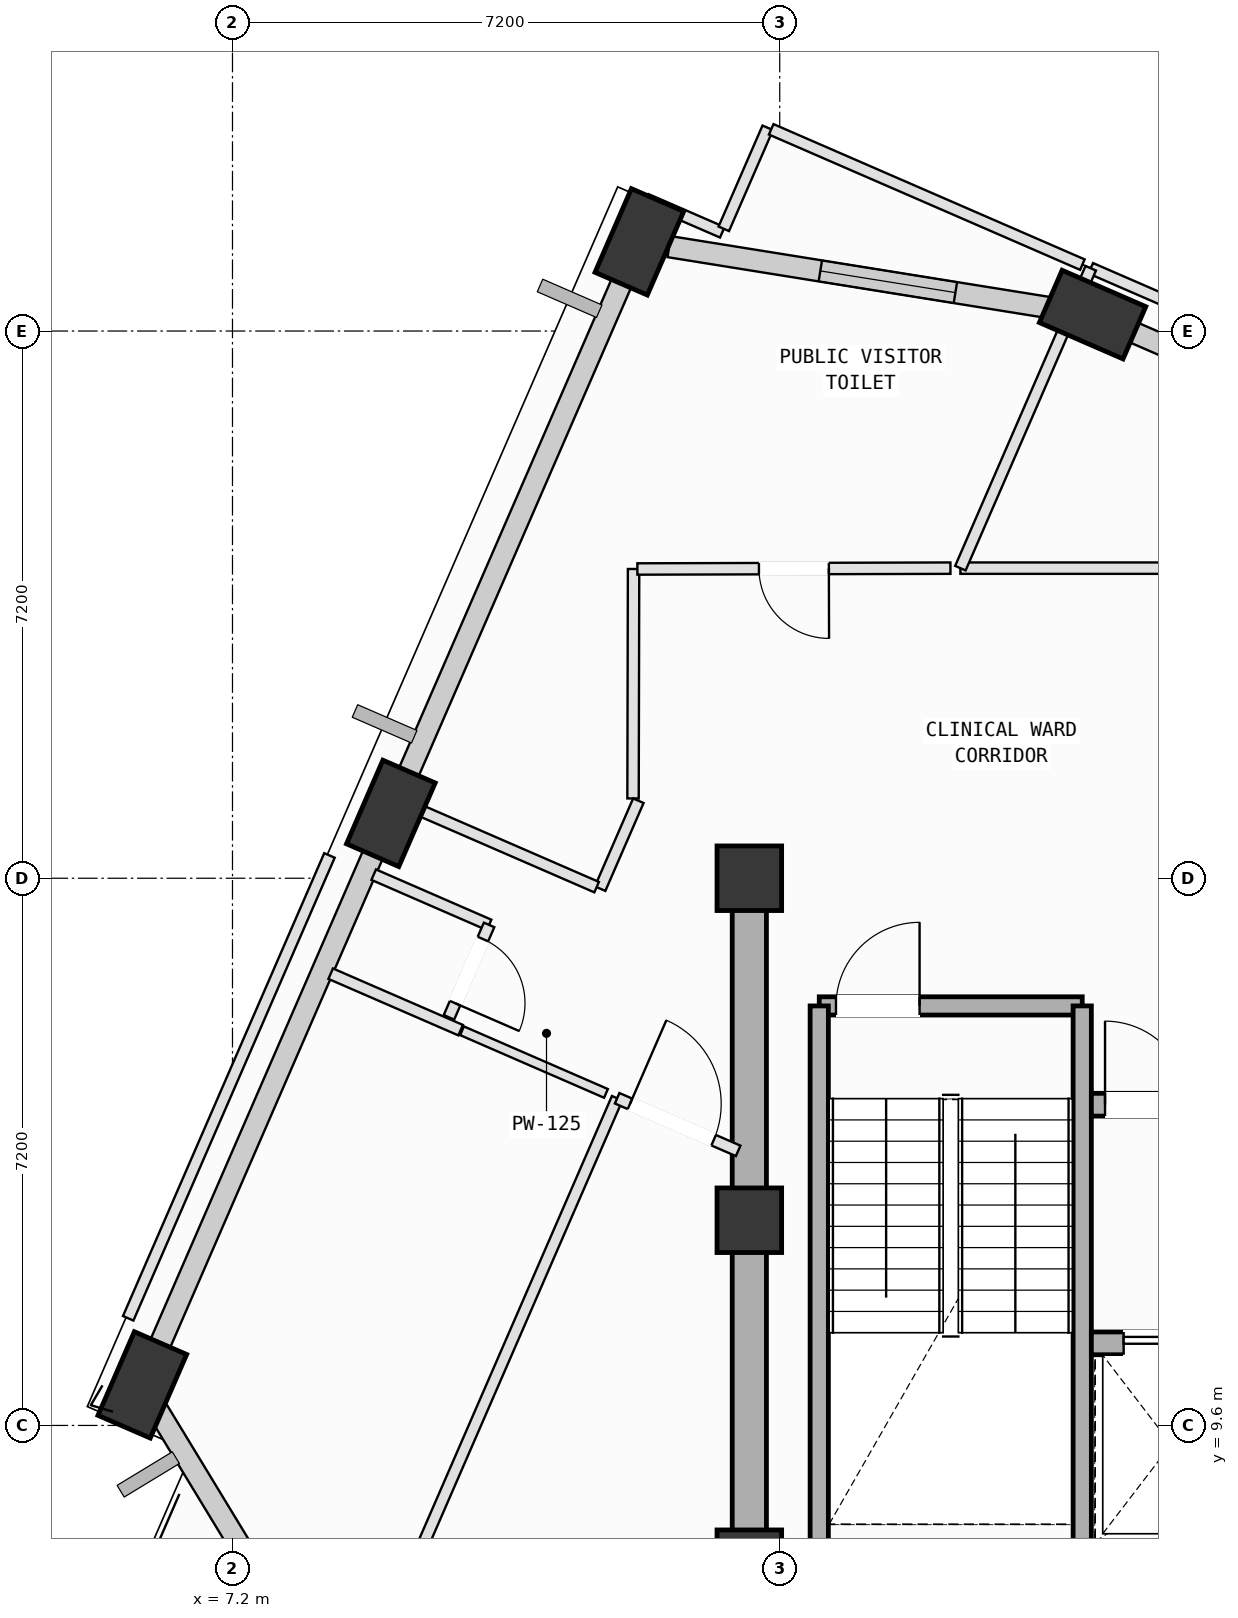
"""IFC4 building model, lengths in metres.
Left out: names, types, materials, properties, quantities, classifications, styles, units other than length and angle.
Written with IfcOpenShell. Run it as: python <this file> out.ifc"""

import sys

from ifc_helpers import new_model, si_unit, direction, frame, frame_2d, origin, origin_2d, place, context, subcontext, project, spatial, rectangle, extrude, element, fill, save


model = new_model("IFC4")
c1 = context("Model", 3, precision=1e-05, world=origin(), true_north=direction((0.0, 1.0)))
c2 = subcontext(c1, "Body", "Model", "MODEL_VIEW")
j1 = project(units=[si_unit("LENGTHUNIT", "METRE"), si_unit("PLANEANGLEUNIT", "RADIAN")], contexts=[c1])
p1 = place(None, origin())
s1 = spatial("IfcSite", under=j1, at=p1, CompositionType="ELEMENT")
p2 = place(p1, origin())
s2 = spatial("IfcBuilding", under=s1, at=p2, CompositionType="ELEMENT")
p3 = place(p2, frame((0.0, 0.0, 308.6)))
s3 = spatial("IfcBuildingStorey", under=s2, at=p3, CompositionType="ELEMENT", Elevation=308.6)
for number, where, z_axis, x_axis in (
    (1, (14.0, 7.8, 0.0), (0.0, 0.0, 1.0), (1.0, 0.0, 0.0)),
    (2, (14.0, 12.3, 0.0), (0.0, 0.0, 1.0), (1.0, 0.0, 0.0)),
    (3, (14.0, 16.8, 0.0), (0.0, 0.0, 1.0), (1.0, 0.0, 0.0)),
):
    element("IfcColumn", number, at=place(p3, frame(where, z_axis=z_axis, x_axis=x_axis)), inside=s3, PredefinedType="COLUMN", context=c2, shape_type="SweptSolid", body=[
        extrude(rectangle(XDim=0.85, YDim=0.85, at=origin_2d()), origin(), (0.0, 0.0, 1.0), 4.0),
    ])
for number, where, z_axis, x_axis in (
    (4, (18.516, 24.216, 0.002), (0.0, 0.0, 1.0), (-0.917, 0.399, 0.0)),
    (5, (12.553, 25.173, 0.002), (0.0, 0.0, 1.0), (0.399, 0.917, 0.0)),
    (6, (9.283, 17.654, 0.002), (0.0, 0.0, 1.0), (0.399, 0.917, 0.0)),
    (7, (6.014, 10.134, 0.002), (0.0, 0.0, 1.0), (0.399, 0.917, 0.0)),
):
    element("IfcColumn", number, at=place(p3, frame(where, z_axis=z_axis, x_axis=x_axis)), inside=s3, PredefinedType="COLUMN", context=c2, shape_type="SweptSolid", body=[
        extrude(rectangle(XDim=1.2, YDim=0.75, at=origin_2d()), origin(), (0.0, 0.0, 1.0), 3.996),
    ])
p4 = place(p3, frame((18.881, 24.058, 0.0), z_axis=(0.0, 0.0, 1.0), x_axis=(0.917070056253, -0.398726111414, 0.0)))
e8 = element("IfcWall", 8, at=p4, inside=s3, PredefinedType="SOLIDWALL", context=c2, shape_type="SweptSolid", body=[
    extrude(rectangle(XDim=6.405, YDim=0.28, at=frame_2d((3.202, 0.0))), origin(), (0.0, 0.0, 1.0), 3.265),
])
p5 = place(p4, frame((1.779, 0.0, 0.75)))
e9 = element("IfcOpeningElement", 9, at=p5, cuts=e8, PredefinedType="OPENING", context=c2, shape_type="SweptSolid", body=[
    extrude(rectangle(XDim=1.4, YDim=1.85, at=frame_2d((0.7, 0.925))), frame((0.0, 0.15, 0.0), z_axis=(0.0, -1.0, 0.0), x_axis=(1.0, 0.0, 0.0)), (0.0, 0.0, 1.0), 0.3),
])
p6 = place(p3, frame((12.946, 25.11, 0.0), z_axis=(0.0, 0.0, 1.0), x_axis=(0.987363821305, -0.158469821666, 0.0)))
e10 = element("IfcWall", 10, at=p6, inside=s3, PredefinedType="SOLIDWALL", context=c2, shape_type="SweptSolid", body=[
    extrude(rectangle(XDim=5.244, YDim=0.28, at=frame_2d((2.622, 0.0))), origin(), (0.0, 0.0, 1.0), 3.265),
])
p7 = place(p6, frame((2.014, 0.0, 0.75)))
e11 = element("IfcOpeningElement", 11, at=p7, cuts=e10, PredefinedType="OPENING", context=c2, shape_type="SweptSolid", body=[
    extrude(rectangle(XDim=1.8, YDim=2.05, at=frame_2d((0.9, 1.025))), frame((0.0, 0.15, 0.0), z_axis=(0.0, -1.0, 0.0), x_axis=(1.0, 0.0, 0.0)), (0.0, 0.0, 1.0), 0.3),
])
p8 = place(p3, frame((9.442, 18.018, 0.0), z_axis=(0.0, 0.0, 1.0), x_axis=(0.398768305896, 0.917051709672, 0.0)))
e12 = element("IfcWall", 12, at=p8, inside=s3, PredefinedType="SOLIDWALL", context=c2, shape_type="SweptSolid", body=[
    extrude(rectangle(XDim=7.405, YDim=0.28, at=frame_2d((3.703, 0.0))), origin(), (0.0, 0.0, 1.0), 3.265),
])
p9 = place(p3, frame((6.172, 10.498, 0.0), z_axis=(0.0, 0.0, 1.0), x_axis=(0.398740578379, 0.917063766133, 0.0)))
e13 = element("IfcWall", 13, at=p9, inside=s3, PredefinedType="SOLIDWALL", context=c2, shape_type="SweptSolid", body=[
    extrude(rectangle(XDim=7.405, YDim=0.28, at=frame_2d((3.702, 0.0))), origin(), (0.0, 0.0, 1.0), 3.265),
])
p10 = place(p3, frame((8.509, 6.027, 0.0), z_axis=(0.0, 0.0, 1.0), x_axis=(-0.51924554751, 0.854625099907, 0.0)))
e14 = element("IfcWall", 14, at=p10, inside=s3, PredefinedType="SOLIDWALL", context=c2, shape_type="SweptSolid", body=[
    extrude(rectangle(XDim=4.407, YDim=0.28, at=frame_2d((2.204, 0.0))), origin(), (0.0, 0.0, 1.0), 3.265),
])
p11 = place(p3, frame((14.92, 15.12, 0.0), z_axis=(0.0, 0.0, 1.0), x_axis=(1.0, 0.0, 0.0)))
e15 = element("IfcWall", 15, at=p11, inside=s3, PredefinedType="SOLIDWALL", context=c2, shape_type="SweptSolid", body=[
    extrude(rectangle(XDim=3.46, YDim=0.24, at=frame_2d((1.73, 0.0))), origin(), (0.0, 0.0, 1.0), 3.78),
])
p12 = place(p11, frame((0.22, 0.0, 0.0)))
e16 = element("IfcOpeningElement", 16, at=p12, cuts=e15, PredefinedType="OPENING", context=c2, shape_type="SweptSolid", body=[
    extrude(rectangle(XDim=1.1, YDim=2.15, at=frame_2d((0.55, 1.075))), frame((0.0, 0.13, 0.0), z_axis=(0.0, -1.0, 0.0), x_axis=(1.0, 0.0, 0.0)), (0.0, 0.0, 1.0), 0.26),
])
for number, where, z_axis, x_axis in (
    (17, (18.38, 15.12, 0.0), (0.0, 0.0, 1.0), (0.0, -1.0, 0.0)),
    (18, (14.92, 8.025, 0.0), (0.0, 0.0, 1.0), (0.0, 1.0, 0.0)),
):
    element("IfcWall", number, at=place(p3, frame(where, z_axis=z_axis, x_axis=x_axis)), inside=s3, PredefinedType="SOLIDWALL", context=c2, shape_type="SweptSolid", body=[
        extrude(rectangle(XDim=7.095, YDim=0.24, at=frame_2d((3.548, 0.0))), origin(), (0.0, 0.0, 1.0), 3.78),
    ])
p13 = place(p3, frame((14.0, 16.8, 0.0), z_axis=(0.0, 0.0, 1.0), x_axis=(0.0, -1.0, 0.0)))
e19 = element("IfcWall", 19, at=p13, inside=s3, PredefinedType="SHEAR", context=c2, shape_type="SweptSolid", body=[
    extrude(rectangle(XDim=9.0, YDim=0.45, at=frame_2d((4.5, 0.0))), origin(), (0.0, 0.0, 1.0), 3.78),
])
p14 = place(p3, frame((18.5, 10.68, 0.0), z_axis=(0.0, 0.0, 1.0), x_axis=(1.0, 0.0, 0.0)))
e20 = element("IfcWall", 20, at=p14, inside=s3, PredefinedType="SOLIDWALL", context=c2, shape_type="SweptSolid", body=[
    extrude(rectangle(XDim=5.3, YDim=0.3, at=frame_2d((2.65, 0.0))), origin(), (0.0, 0.0, 1.0), 3.78),
])
p15 = place(p14, frame((4.22, 0.0, 0.0)))
e21 = element("IfcOpeningElement", 21, at=p15, cuts=e20, PredefinedType="OPENING", context=c2, shape_type="SweptSolid", body=[
    extrude(rectangle(XDim=0.86, YDim=2.06, at=frame_2d((0.43, 1.03))), frame((0.0, 0.16, 0.0), z_axis=(0.0, -1.0, 0.0), x_axis=(1.0, 0.0, 0.0)), (0.0, 0.0, 1.0), 0.32),
])
p16 = place(p14, frame((0.425, 0.0, 0.0)))
e22 = element("IfcOpeningElement", 22, at=p16, cuts=e20, PredefinedType="OPENING", context=c2, shape_type="SweptSolid", body=[
    extrude(rectangle(XDim=1.25, YDim=2.18, at=frame_2d((0.625, 1.09))), frame((0.0, 0.16, 0.0), z_axis=(0.0, -1.0, 0.0), x_axis=(1.0, 0.0, 0.0)), (0.0, 0.0, 1.0), 0.32),
])
p17 = place(p14, frame((2.525, 0.0, 0.0)))
e23 = element("IfcOpeningElement", 23, at=p17, cuts=e20, PredefinedType="OPENING", context=c2, shape_type="SweptSolid", body=[
    extrude(rectangle(XDim=1.25, YDim=2.18, at=frame_2d((0.625, 1.09))), frame((0.0, 0.16, 0.0), z_axis=(0.0, -1.0, 0.0), x_axis=(1.0, 0.0, 0.0)), (0.0, 0.0, 1.0), 0.32),
])
p18 = place(p3, frame((18.5, 13.82, 0.0), z_axis=(0.0, 0.0, 1.0), x_axis=(1.0, 0.0, 0.0)))
e24 = element("IfcWall", 24, at=p18, inside=s3, PredefinedType="SOLIDWALL", context=c2, shape_type="SweptSolid", body=[
    extrude(rectangle(XDim=5.3, YDim=0.3, at=frame_2d((2.65, 0.0))), origin(), (0.0, 0.0, 1.0), 3.78),
])
p19 = place(p18, frame((0.18, 0.0, 0.0)))
e25 = element("IfcOpeningElement", 25, at=p19, cuts=e24, PredefinedType="OPENING", context=c2, shape_type="SweptSolid", body=[
    extrude(rectangle(XDim=1.1, YDim=2.15, at=frame_2d((0.55, 1.075))), frame((0.0, 0.16, 0.0), z_axis=(0.0, -1.0, 0.0), x_axis=(1.0, 0.0, 0.0)), (0.0, 0.0, 1.0), 0.32),
])
p20 = place(p3, frame((8.6, 5.487, 0.0), z_axis=(0.0, 0.0, 1.0), x_axis=(0.398808773401, 0.917034111829, 0.0)))
e26 = element("IfcWall", 26, at=p20, inside=s3, PredefinedType="PARTITIONING", context=c2, shape_type="SweptSolid", body=[
    extrude(rectangle(XDim=9.179, YDim=0.15, at=frame_2d((4.59, 0.0))), origin(), (0.0, 0.0, 1.0), 3.78),
])
p21 = place(p3, frame((12.261, 13.905, 0.0), z_axis=(0.0, 0.0, 1.0), x_axis=(0.91708123515, -0.398700398965, 0.0)))
e27 = element("IfcWall", 27, at=p21, inside=s3, PredefinedType="PARTITIONING", context=c2, shape_type="SweptSolid", body=[
    extrude(rectangle(XDim=1.736, YDim=0.15, at=frame_2d((0.868, 0.0))), origin(), (0.0, 0.0, 1.0), 3.78),
])
p22 = place(p21, frame((0.184, 0.0, 0.0)))
e28 = element("IfcOpeningElement", 28, at=p22, cuts=e27, PredefinedType="OPENING", context=c2, shape_type="SweptSolid", body=[
    extrude(rectangle(XDim=1.2, YDim=2.15, at=frame_2d((0.6, 1.075))), frame((0.0, 0.085, 0.0), z_axis=(0.0, -1.0, 0.0), x_axis=(1.0, 0.0, 0.0)), (0.0, 0.0, 1.0), 0.17),
])
p23 = place(p3, frame((8.492, 15.544, 0.0), z_axis=(0.0, 0.0, 1.0), x_axis=(0.917176199692, -0.398481892585, 0.0)))
e29 = element("IfcWall", 29, at=p23, inside=s3, PredefinedType="PARTITIONING", context=c2, shape_type="SweptSolid", body=[
    extrude(rectangle(XDim=1.864, YDim=0.15, at=frame_2d((0.932, 0.0))), origin(), (0.0, 0.0, 1.0), 3.78),
])
p24 = place(p3, frame((10.22, 14.793, 0.0), z_axis=(0.0, 0.0, 1.0), x_axis=(0.916985473765, -0.398920594735, 0.0)))
e30 = element("IfcWall", 30, at=p24, inside=s3, PredefinedType="PARTITIONING", context=c2, shape_type="SweptSolid", body=[
    extrude(rectangle(XDim=2.065, YDim=0.125, at=frame_2d((1.033, 0.0))), origin(), (0.0, 0.0, 1.0), 3.78),
])
p25 = place(p3, frame((18.492, 24.826, 0.0), z_axis=(0.0, 0.0, 1.0), x_axis=(0.917125302545, -0.398599020862, 0.0)))
e31 = element("IfcWall", 31, at=p25, inside=s3, PredefinedType="PARTITIONING", context=c2, shape_type="SweptSolid", body=[
    extrude(rectangle(XDim=5.83, YDim=0.15, at=frame_2d((2.915, 0.0))), origin(), (0.0, 0.0, 1.0), 3.78),
])
p26 = place(p3, frame((23.134, 20.88, 0.0), z_axis=(0.0, 0.0, 1.0), x_axis=(-1.0, 0.0, 0.0)))
e32 = element("IfcWall", 32, at=p26, inside=s3, PredefinedType="PARTITIONING", context=c2, shape_type="SweptSolid", body=[
    extrude(rectangle(XDim=6.357, YDim=0.15, at=frame_2d((3.178, 0.0))), origin(), (0.0, 0.0, 1.0), 3.78),
])
p27 = place(p26, frame((2.719, 0.0, 0.0)))
e33 = element("IfcOpeningElement", 33, at=p27, cuts=e32, PredefinedType="OPENING", context=c2, shape_type="SweptSolid", body=[
    extrude(rectangle(XDim=0.92, YDim=2.1, at=frame_2d((0.46, 1.05))), frame((0.0, 0.085, 0.0), z_axis=(0.0, -1.0, 0.0), x_axis=(1.0, 0.0, 0.0)), (0.0, 0.0, 1.0), 0.17),
])
p28 = place(p3, frame((16.777, 20.88, 0.0), z_axis=(0.0, 0.0, 1.0), x_axis=(0.398564265288, 0.917140407154, 0.0)))
e34 = element("IfcWall", 34, at=p28, inside=s3, PredefinedType="PARTITIONING", context=c2, shape_type="SweptSolid", body=[
    extrude(rectangle(XDim=4.302, YDim=0.15, at=frame_2d((2.151, 0.0))), origin(), (0.0, 0.0, 1.0), 2.765),
])
p29 = place(p3, frame((12.477, 20.869, 0.0), z_axis=(0.0, 0.0, 1.0), x_axis=(-0.002345323109, -0.999997249726, 0.0)))
e35 = element("IfcWall", 35, at=p29, inside=s3, PredefinedType="PARTITIONING", context=c2, shape_type="SweptSolid", body=[
    extrude(rectangle(XDim=3.019, YDim=0.15, at=frame_2d((1.509, 0.0))), origin(), (0.0, 0.0, 1.0), 3.78),
])
p30 = place(p3, frame((12.54, 17.82, 0.0), z_axis=(0.0, 0.0, 1.0), x_axis=(-0.398655347011, -0.917100820139, 0.0)))
e36 = element("IfcWall", 36, at=p30, inside=s3, PredefinedType="PARTITIONING", context=c2, shape_type="SweptSolid", body=[
    extrude(rectangle(XDim=1.261, YDim=0.15, at=frame_2d((0.631, 0.0))), origin(), (0.0, 0.0, 1.0), 3.78),
])
p31 = place(p3, frame((11.991, 16.683, 0.0), z_axis=(0.0, 0.0, 1.0), x_axis=(-0.917068787669, 0.398729029146, 0.0)))
e37 = element("IfcWall", 37, at=p31, inside=s3, PredefinedType="PARTITIONING", context=c2, shape_type="SweptSolid", body=[
    extrude(rectangle(XDim=3.06, YDim=0.15, at=frame_2d((1.53, 0.0))), origin(), (0.0, 0.0, 1.0), 2.765),
])
p32 = place(p3, frame((12.22, 24.885, 0.0), z_axis=(0.0, 0.0, 1.0), x_axis=(0.399235297463, 0.916848502894, 0.0)))
e38 = element("IfcWall", 38, at=p32, inside=s3, PredefinedType="PARTITIONING", context=c2, shape_type="SweptSolid", body=[
    extrude(rectangle(XDim=0.947, YDim=0.15, at=frame_2d((0.473, 0.0))), origin(), (0.0, 0.0, 1.0), 3.265),
])
p33 = place(p3, frame((12.644, 25.733, 0.0), z_axis=(0.0, 0.0, 1.0), x_axis=(0.9173866736, -0.397997099362, 0.0)))
e39 = element("IfcWall", 39, at=p33, inside=s3, PredefinedType="PARTITIONING", context=c2, shape_type="SweptSolid", body=[
    extrude(rectangle(XDim=1.09, YDim=0.15, at=frame_2d((0.545, 0.0))), origin(), (0.0, 0.0, 1.0), 3.265),
])
p34 = place(p3, frame((13.664, 25.345, 0.0), z_axis=(0.0, 0.0, 1.0), x_axis=(0.398732271116, 0.917067378097, 0.0)))
e40 = element("IfcWall", 40, at=p34, inside=s3, PredefinedType="PARTITIONING", context=c2, shape_type="SweptSolid", body=[
    extrude(rectangle(XDim=1.449, YDim=0.15, at=frame_2d((0.725, 0.0))), origin(), (0.0, 0.0, 1.0), 3.78),
])
p35 = place(p3, frame((14.288, 26.654, 0.0), z_axis=(0.0, 0.0, 1.0), x_axis=(0.91706744789, -0.398732110595, 0.0)))
e41 = element("IfcWall", 41, at=p35, inside=s3, PredefinedType="PARTITIONING", context=c2, shape_type="SweptSolid", body=[
    extrude(rectangle(XDim=4.464, YDim=0.15, at=frame_2d((2.232, 0.0))), origin(), (0.0, 0.0, 1.0), 3.78),
])
p36 = place(p3, frame((16.646, 20.88, 0.0), z_axis=(0.0, 0.0, 1.0), x_axis=(-0.999996442777, -0.002667289427, 0.0)))
e42 = element("IfcWall", 42, at=p36, inside=s3, PredefinedType="PARTITIONING", context=c2, shape_type="SweptSolid", body=[
    extrude(rectangle(XDim=4.119, YDim=0.15, at=frame_2d((2.06, 0.0))), origin(), (0.0, 0.0, 1.0), 3.415),
])
p37 = place(p36, frame((1.6, 0.0, 0.0)))
e43 = element("IfcOpeningElement", 43, at=p37, cuts=e42, PredefinedType="OPENING", context=c2, shape_type="SweptSolid", body=[
    extrude(rectangle(XDim=0.92, YDim=2.1, at=frame_2d((0.46, 1.05))), frame((0.0, 0.085, 0.0), z_axis=(0.0, -1.0, 0.0), x_axis=(1.0, 0.0, 0.0)), (0.0, 0.0, 1.0), 0.17),
])
p38 = place(p3, frame((5.828, 11.01, 0.0), z_axis=(0.0, 0.0, 1.0), x_axis=(0.398767783479, 0.917051936838, 0.0)))
e44 = element("IfcWall", 44, at=p38, inside=s3, PredefinedType="PARTITIONING", context=c2, shape_type="SweptSolid", body=[
    extrude(rectangle(XDim=6.641, YDim=0.15, at=frame_2d((3.32, 0.0))), origin(), (0.0, 0.0, 1.0), 3.78),
])
p39 = place(p3, frame((9.058, 16.847, 0.0), z_axis=(0.0, 0.0, 1.0), x_axis=(0.916856565806, -0.399216780382, 0.0)))
e45 = element("IfcWall", 45, at=p39, inside=s3, PredefinedType="PARTITIONING", context=c2, shape_type="SweptSolid", body=[
    extrude(rectangle(XDim=1.656, YDim=0.15, at=frame_2d((0.828, 0.0))), origin(), (0.0, 0.0, 1.0), 3.78),
])
p40 = place(p3, frame((10.576, 16.186, 0.0), z_axis=(0.0, 0.0, 1.0), x_axis=(-0.3981603712, -0.917315822825, 0.0)))
e46 = element("IfcWall", 46, at=p40, inside=s3, PredefinedType="PARTITIONING", context=c2, shape_type="SweptSolid", body=[
    extrude(rectangle(XDim=1.326, YDim=0.15, at=frame_2d((0.663, 0.0))), origin(), (0.0, 0.0, 1.0), 3.78),
])
p41 = place(p40, frame((0.203, 0.0, 0.0)))
e47 = element("IfcOpeningElement", 47, at=p41, cuts=e46, PredefinedType="OPENING", context=c2, shape_type="SweptSolid", body=[
    extrude(rectangle(XDim=0.92, YDim=2.1, at=frame_2d((0.46, 1.05))), frame((0.0, 0.085, 0.0), z_axis=(0.0, -1.0, 0.0), x_axis=(1.0, 0.0, 0.0)), (0.0, 0.0, 1.0), 0.17),
])
p42 = place(p7, origin())
e48 = element("IfcWindow", 48, at=p42, inside=s3, PartitioningType="SINGLE_PANEL", PredefinedType="WINDOW", context=c2, shape_type="SweptSolid", body=[
    extrude(rectangle(XDim=1.8, YDim=2.05, at=frame_2d((0.9, 1.025))), frame((0.0, 0.03, 0.0), z_axis=(0.0, -1.0, 0.0), x_axis=(1.0, 0.0, 0.0)), (0.0, 0.0, 1.0), 0.06),
])
fill(e11, e48)
p43 = place(p12, origin())
e49 = element("IfcDoor", 49, at=p43, inside=s3, OperationType="SINGLE_SWING_RIGHT", PredefinedType="DOOR", context=c2, shape_type="SweptSolid", body=[
    extrude(rectangle(XDim=1.1, YDim=2.15, at=frame_2d((0.55, 1.075))), frame((0.0, 0.025, 0.0), z_axis=(0.0, -1.0, 0.0), x_axis=(1.0, 0.0, 0.0)), (0.0, 0.0, 1.0), 0.05),
])
fill(e16, e49)
p44 = place(p19, origin())
e50 = element("IfcDoor", 50, at=p44, inside=s3, OperationType="SINGLE_SWING_LEFT", PredefinedType="DOOR", context=c2, shape_type="SweptSolid", body=[
    extrude(rectangle(XDim=1.1, YDim=2.15, at=frame_2d((0.55, 1.075))), frame((0.0, 0.025, 0.0), z_axis=(0.0, -1.0, 0.0), x_axis=(1.0, 0.0, 0.0)), (0.0, 0.0, 1.0), 0.05),
])
fill(e25, e50)
p45 = place(p16, origin())
e51 = element("IfcDoor", 51, at=p45, inside=s3, OperationType="DOUBLE_DOOR_SLIDING", PredefinedType="DOOR", context=c2, shape_type="SweptSolid", body=[
    extrude(rectangle(XDim=1.25, YDim=2.18, at=frame_2d((0.625, 1.09))), frame((0.0, 0.025, 0.0), z_axis=(0.0, -1.0, 0.0), x_axis=(1.0, 0.0, 0.0)), (0.0, 0.0, 1.0), 0.05),
])
fill(e22, e51)
p46 = place(p22, origin())
e52 = element("IfcDoor", 52, at=p46, inside=s3, OperationType="SINGLE_SWING_LEFT", PredefinedType="DOOR", context=c2, shape_type="SweptSolid", body=[
    extrude(rectangle(XDim=1.2, YDim=2.15, at=frame_2d((0.6, 1.075))), frame((0.0, 0.025, 0.0), z_axis=(0.0, -1.0, 0.0), x_axis=(1.0, 0.0, 0.0)), (0.0, 0.0, 1.0), 0.05),
])
fill(e28, e52)
p47 = place(p37, origin())
e53 = element("IfcDoor", 53, at=p47, inside=s3, OperationType="SINGLE_SWING_LEFT", PredefinedType="DOOR", context=c2, shape_type="SweptSolid", body=[
    extrude(rectangle(XDim=0.92, YDim=2.1, at=frame_2d((0.46, 1.05))), frame((0.0, 0.025, 0.0), z_axis=(0.0, -1.0, 0.0), x_axis=(1.0, 0.0, 0.0)), (0.0, 0.0, 1.0), 0.05),
])
fill(e43, e53)
p48 = place(p41, origin())
e54 = element("IfcDoor", 54, at=p48, inside=s3, OperationType="SINGLE_SWING_RIGHT", PredefinedType="DOOR", context=c2, shape_type="SweptSolid", body=[
    extrude(rectangle(XDim=0.92, YDim=2.1, at=frame_2d((0.46, 1.05))), frame((0.0, 0.025, 0.0), z_axis=(0.0, -1.0, 0.0), x_axis=(1.0, 0.0, 0.0)), (0.0, 0.0, 1.0), 0.05),
])
fill(e47, e54)
save(model, sys.argv[1])
